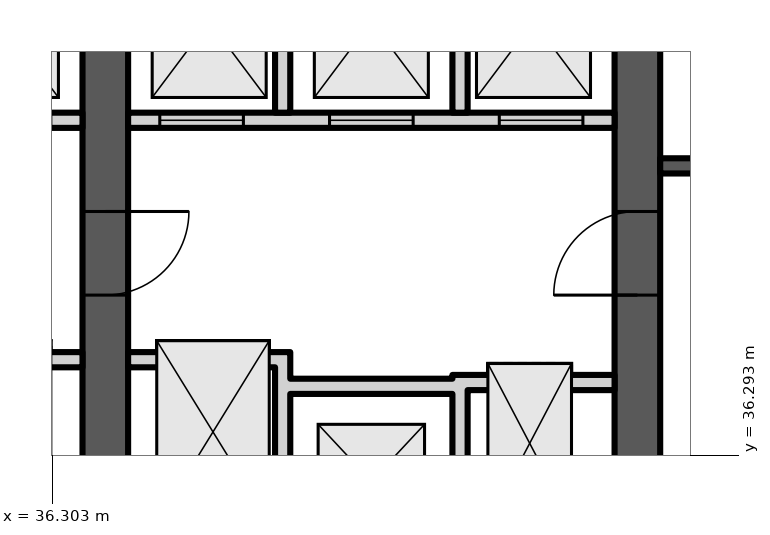
"""IFC4 building model, lengths in metres.
Left out: names, types, materials, properties, quantities, classifications, styles, units other than length and angle.
Written with IfcOpenShell. Run it as: python <this file> out.ifc"""

import sys

from ifc_helpers import new_model, si_unit, direction, frame, frame_2d, origin, place, context, subcontext, project, spatial, polyline, rectangle, outline, extrude, element, fill, save


model = new_model("IFC4")
c1 = context("Model", 3, precision=1e-05, world=origin(), true_north=direction((0.0, 1.0)))
c2 = subcontext(c1, "Body", "Model", "MODEL_VIEW")
j1 = project(units=[si_unit("LENGTHUNIT", "METRE"), si_unit("PLANEANGLEUNIT", "RADIAN")], contexts=[c1])
p1 = place(None, origin())
s1 = spatial("IfcSite", under=j1, at=p1, CompositionType="ELEMENT")
p2 = place(p1, origin())
s2 = spatial("IfcBuilding", under=s1, at=p2, CompositionType="ELEMENT")
p3 = place(p2, frame((0.0, 0.0, 232.3)))
s3 = spatial("IfcBuildingStorey", under=s2, at=p3, CompositionType="ELEMENT", Elevation=232.3)
p4 = place(p3, frame((37.0, 34.6, 0.0), z_axis=(0.0, 0.0, 1.0), x_axis=(0.0, 1.0, 0.0)))
e1 = element("IfcWall", 1, at=p4, inside=s3, PredefinedType="SHEAR", context=c2, shape_type="SweptSolid", body=[
    extrude(rectangle(XDim=14.784, YDim=0.6, at=frame_2d((7.392, 0.0))), origin(), (0.0, 0.0, 1.0), 3.6),
])
p5 = place(p4, frame((11.302, 0.0, 0.0)))
e2 = element("IfcOpeningElement", 2, at=p5, cuts=e1, PredefinedType="OPENING", context=c2, shape_type="SweptSolid", body=[
    extrude(rectangle(XDim=1.0, YDim=2.1, at=frame_2d((0.5, 1.05))), frame((0.0, 0.31, 0.0), z_axis=(0.0, -1.0, 0.0), x_axis=(1.0, 0.0, 0.0)), (0.0, 0.0, 1.0), 0.62),
])
p6 = place(p4, frame((3.8, 0.0, 0.0)))
e3 = element("IfcOpeningElement", 3, at=p6, cuts=e1, PredefinedType="OPENING", context=c2, shape_type="SweptSolid", body=[
    extrude(rectangle(XDim=1.1, YDim=2.1, at=frame_2d((0.55, 1.05))), frame((0.0, 0.31, 0.0), z_axis=(0.0, -1.0, 0.0), x_axis=(1.0, 0.0, 0.0)), (0.0, 0.0, 1.0), 0.62),
])
p7 = place(p3, frame((44.0, 34.6, 0.0), z_axis=(0.0, 0.0, 1.0), x_axis=(0.0, 1.0, 0.0)))
e4 = element("IfcWall", 4, at=p7, inside=s3, PredefinedType="SHEAR", context=c2, shape_type="SweptSolid", body=[
    extrude(rectangle(XDim=14.784, YDim=0.6, at=frame_2d((7.392, 0.0))), origin(), (0.0, 0.0, 1.0), 3.6),
])
p8 = place(p7, frame((11.608, 0.0, 0.0)))
e5 = element("IfcOpeningElement", 5, at=p8, cuts=e4, PredefinedType="OPENING", context=c2, shape_type="SweptSolid", body=[
    extrude(rectangle(XDim=1.0, YDim=2.1, at=frame_2d((0.5, 1.05))), frame((0.0, 0.31, 0.0), z_axis=(0.0, -1.0, 0.0), x_axis=(1.0, 0.0, 0.0)), (0.0, 0.0, 1.0), 0.62),
])
p9 = place(p7, frame((3.8, 0.0, 0.0)))
e6 = element("IfcOpeningElement", 6, at=p9, cuts=e4, PredefinedType="OPENING", context=c2, shape_type="SweptSolid", body=[
    extrude(rectangle(XDim=1.1, YDim=2.1, at=frame_2d((0.55, 1.05))), frame((0.0, 0.31, 0.0), z_axis=(0.0, -1.0, 0.0), x_axis=(1.0, 0.0, 0.0)), (0.0, 0.0, 1.0), 0.62),
])
p10 = place(p3, frame((30.3, 40.7, 0.0), z_axis=(0.0, 0.0, 1.0), x_axis=(1.0, 0.0, 0.0)))
e7 = element("IfcWall", 7, at=p10, inside=s3, PredefinedType="PARTITIONING", context=c2, shape_type="SweptSolid", body=[
    extrude(rectangle(XDim=6.4, YDim=0.2, at=frame_2d((3.2, 0.0))), origin(), (0.0, 0.0, 1.0), 3.2),
])
p11 = place(p10, frame((0.417, 0.0, 0.0)))
e8 = element("IfcOpeningElement", 8, at=p11, cuts=e7, PredefinedType="OPENING", context=c2, shape_type="SweptSolid", body=[
    extrude(rectangle(XDim=1.1, YDim=2.1, at=frame_2d((0.55, 1.05))), frame((0.0, 0.11, 0.0), z_axis=(0.0, -1.0, 0.0), x_axis=(1.0, 0.0, 0.0)), (0.0, 0.0, 1.0), 0.22),
])
p12 = place(p10, frame((2.65, 0.0, 0.0)))
e9 = element("IfcOpeningElement", 9, at=p12, cuts=e7, PredefinedType="OPENING", context=c2, shape_type="SweptSolid", body=[
    extrude(rectangle(XDim=1.1, YDim=2.1, at=frame_2d((0.55, 1.05))), frame((0.0, 0.11, 0.0), z_axis=(0.0, -1.0, 0.0), x_axis=(1.0, 0.0, 0.0)), (0.0, 0.0, 1.0), 0.22),
])
p13 = place(p10, frame((4.883, 0.0, 0.0)))
e10 = element("IfcOpeningElement", 10, at=p13, cuts=e7, PredefinedType="OPENING", context=c2, shape_type="SweptSolid", body=[
    extrude(rectangle(XDim=1.1, YDim=2.1, at=frame_2d((0.55, 1.05))), frame((0.0, 0.11, 0.0), z_axis=(0.0, -1.0, 0.0), x_axis=(1.0, 0.0, 0.0)), (0.0, 0.0, 1.0), 0.22),
])
p14 = place(p3, frame((0.0, 0.0, -0.0)))
e11 = element("IfcWall", 11, at=p14, inside=s3, PredefinedType="PARTITIONING", context=c2, shape_type="SweptSolid", body=[
    extrude(outline(polyline([(34.567, 37.65), (34.767, 37.65), (36.7, 37.65), (36.7, 37.45), (34.767, 37.45), (34.767, 34.6), (34.567, 34.6), (34.567, 37.65)])), origin(), (0.0, 0.0, 1.0), 3.2),
])
p15 = place(p3, frame((0.0, 0.0, -0.0)))
e12 = element("IfcWall", 12, at=p15, inside=s3, PredefinedType="PARTITIONING", context=c2, shape_type="SweptSolid", body=[
    extrude(outline(polyline([(32.433, 40.8), (32.233, 40.8), (32.233, 43.8), (30.3, 43.8), (30.3, 44.0), (36.7, 44.0), (36.7, 43.8), (34.767, 43.8), (34.767, 40.8), (34.567, 40.8), (34.567, 43.8), (32.433, 43.8), (32.433, 40.8)])), origin(), (0.0, 0.0, 1.0), 3.2),
])
p16 = place(p3, frame((37.3, 40.7, 0.0), z_axis=(0.0, 0.0, 1.0), x_axis=(1.0, 0.0, 0.0)))
e13 = element("IfcWall", 13, at=p16, inside=s3, PredefinedType="PARTITIONING", context=c2, shape_type="SweptSolid", body=[
    extrude(rectangle(XDim=6.4, YDim=0.2, at=frame_2d((3.2, 0.0))), origin(), (0.0, 0.0, 1.0), 3.2),
])
p17 = place(p16, frame((0.417, 0.0, 0.0)))
e14 = element("IfcOpeningElement", 14, at=p17, cuts=e13, PredefinedType="OPENING", context=c2, shape_type="SweptSolid", body=[
    extrude(rectangle(XDim=1.1, YDim=2.1, at=frame_2d((0.55, 1.05))), frame((0.0, 0.11, 0.0), z_axis=(0.0, -1.0, 0.0), x_axis=(1.0, 0.0, 0.0)), (0.0, 0.0, 1.0), 0.22),
])
p18 = place(p16, frame((2.65, 0.0, 0.0)))
e15 = element("IfcOpeningElement", 15, at=p18, cuts=e13, PredefinedType="OPENING", context=c2, shape_type="SweptSolid", body=[
    extrude(rectangle(XDim=1.1, YDim=2.1, at=frame_2d((0.55, 1.05))), frame((0.0, 0.11, 0.0), z_axis=(0.0, -1.0, 0.0), x_axis=(1.0, 0.0, 0.0)), (0.0, 0.0, 1.0), 0.22),
])
p19 = place(p16, frame((4.883, 0.0, 0.0)))
e16 = element("IfcOpeningElement", 16, at=p19, cuts=e13, PredefinedType="OPENING", context=c2, shape_type="SweptSolid", body=[
    extrude(rectangle(XDim=1.1, YDim=2.1, at=frame_2d((0.55, 1.05))), frame((0.0, 0.11, 0.0), z_axis=(0.0, -1.0, 0.0), x_axis=(1.0, 0.0, 0.0)), (0.0, 0.0, 1.0), 0.22),
])
p20 = place(p3, frame((0.0, 0.0, -0.0)))
e17 = element("IfcWall", 17, at=p20, inside=s3, PredefinedType="PARTITIONING", context=c2, shape_type="SweptSolid", body=[
    extrude(outline(polyline([(41.567, 37.1), (39.433, 37.1), (39.433, 34.6), (39.233, 34.6), (39.233, 37.45), (37.3, 37.45), (37.3, 37.65), (39.233, 37.65), (39.433, 37.65), (39.433, 37.3), (41.567, 37.3), (41.567, 37.35), (41.767, 37.35), (43.7, 37.35), (43.7, 37.15), (41.767, 37.15), (41.767, 34.6), (41.567, 34.6), (41.567, 37.1)])), origin(), (0.0, 0.0, 1.0), 3.2),
])
p21 = place(p3, frame((0.0, 0.0, -0.0)))
e18 = element("IfcWall", 18, at=p21, inside=s3, PredefinedType="PARTITIONING", context=c2, shape_type="SweptSolid", body=[
    extrude(outline(polyline([(39.433, 40.8), (39.233, 40.8), (39.233, 43.8), (37.3, 43.8), (37.3, 44.0), (43.7, 44.0), (43.7, 43.8), (41.767, 43.8), (41.767, 40.8), (41.567, 40.8), (41.567, 43.8), (39.433, 43.8), (39.433, 40.8)])), origin(), (0.0, 0.0, 1.0), 3.2),
])
p22 = place(p3, frame((44.3, 40.1, 0.0), z_axis=(0.0, 0.0, 1.0), x_axis=(1.0, 0.0, 0.0)))
e19 = element("IfcWall", 19, at=p22, inside=s3, PredefinedType="SHEAR", context=c2, shape_type="SweptSolid", body=[
    extrude(rectangle(XDim=6.4, YDim=0.2, at=frame_2d((3.2, 0.0))), origin(), (0.0, 0.0, 1.0), 3.2),
])
p23 = place(p22, frame((3.625, 0.0, 0.0)))
e20 = element("IfcOpeningElement", 20, at=p23, cuts=e19, PredefinedType="OPENING", context=c2, shape_type="SweptSolid", body=[
    extrude(rectangle(XDim=1.2, YDim=2.1, at=frame_2d((0.6, 1.05))), frame((0.0, 0.11, 0.0), z_axis=(0.0, -1.0, 0.0), x_axis=(1.0, 0.0, 0.0)), (0.0, 0.0, 1.0), 0.22),
])
p24 = place(p22, frame((0.625, 0.0, 0.0)))
e21 = element("IfcOpeningElement", 21, at=p24, cuts=e19, PredefinedType="OPENING", context=c2, shape_type="SweptSolid", body=[
    extrude(rectangle(XDim=0.9, YDim=2.1, at=frame_2d((0.45, 1.05))), frame((0.0, 0.11, 0.0), z_axis=(0.0, -1.0, 0.0), x_axis=(1.0, 0.0, 0.0)), (0.0, 0.0, 1.0), 0.22),
])
p25 = place(p17, origin())
e22 = element("IfcDoor", 22, at=p25, inside=s3, OperationType="DOUBLE_DOOR_SLIDING", PredefinedType="DOOR", context=c2, shape_type="SweptSolid", body=[
    extrude(rectangle(XDim=1.1, YDim=2.1, at=frame_2d((0.55, 1.05))), frame((0.0, 0.025, 0.0), z_axis=(0.0, -1.0, 0.0), x_axis=(1.0, 0.0, 0.0)), (0.0, 0.0, 1.0), 0.05),
])
fill(e14, e22)
p26 = place(p18, origin())
e23 = element("IfcDoor", 23, at=p26, inside=s3, OperationType="DOUBLE_DOOR_SLIDING", PredefinedType="DOOR", context=c2, shape_type="SweptSolid", body=[
    extrude(rectangle(XDim=1.1, YDim=2.1, at=frame_2d((0.55, 1.05))), frame((0.0, 0.025, 0.0), z_axis=(0.0, -1.0, 0.0), x_axis=(1.0, 0.0, 0.0)), (0.0, 0.0, 1.0), 0.05),
])
fill(e15, e23)
p27 = place(p19, origin())
e24 = element("IfcDoor", 24, at=p27, inside=s3, OperationType="DOUBLE_DOOR_SLIDING", PredefinedType="DOOR", context=c2, shape_type="SweptSolid", body=[
    extrude(rectangle(XDim=1.1, YDim=2.1, at=frame_2d((0.55, 1.05))), frame((0.0, 0.025, 0.0), z_axis=(0.0, -1.0, 0.0), x_axis=(1.0, 0.0, 0.0)), (0.0, 0.0, 1.0), 0.05),
])
fill(e16, e24)
p28 = place(p6, origin())
e25 = element("IfcDoor", 25, at=p28, inside=s3, OperationType="SINGLE_SWING_RIGHT", PredefinedType="DOOR", context=c2, shape_type="SweptSolid", body=[
    extrude(rectangle(XDim=1.1, YDim=2.1, at=frame_2d((0.55, 1.05))), frame((0.0, 0.025, 0.0), z_axis=(0.0, -1.0, 0.0), x_axis=(1.0, 0.0, 0.0)), (0.0, 0.0, 1.0), 0.05),
])
fill(e3, e25)
p29 = place(p9, origin())
e26 = element("IfcDoor", 26, at=p29, inside=s3, OperationType="SINGLE_SWING_LEFT", PredefinedType="DOOR", context=c2, shape_type="SweptSolid", body=[
    extrude(rectangle(XDim=1.1, YDim=2.1, at=frame_2d((0.55, 1.05))), frame((0.0, 0.025, 0.0), z_axis=(0.0, -1.0, 0.0), x_axis=(1.0, 0.0, 0.0)), (0.0, 0.0, 1.0), 0.05),
])
fill(e6, e26)
save(model, sys.argv[1])
